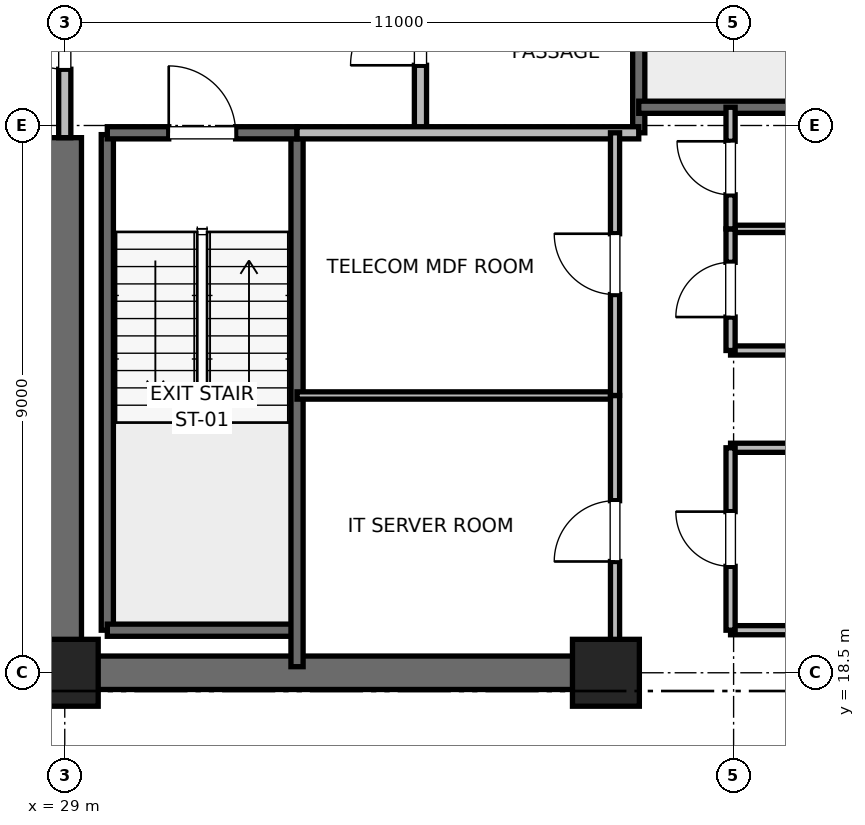
"""IFC4 building model, lengths in metres.
Left out: names, types, materials, properties, quantities, classifications, styles, units other than length and angle.
Written with IfcOpenShell. Run it as: python <this file> out.ifc"""

import sys

from ifc_helpers import new_model, si_unit, direction, frame, frame_2d, origin, origin_2d, place, context, subcontext, project, spatial, rectangle, extrude, element, fill, save


model = new_model("IFC4")
c1 = context("Model", 3, precision=1e-05, world=origin(), true_north=direction((0.0, 1.0)))
c2 = subcontext(c1, "Body", "Model", "MODEL_VIEW")
j1 = project(units=[si_unit("LENGTHUNIT", "METRE"), si_unit("PLANEANGLEUNIT", "RADIAN")], contexts=[c1])
p1 = place(None, origin())
s1 = spatial("IfcSite", under=j1, at=p1, CompositionType="ELEMENT")
p2 = place(p1, origin())
s2 = spatial("IfcBuilding", under=s1, at=p2, CompositionType="ELEMENT")
p3 = place(p2, frame((0.0, 0.0, 156.4)))
s3 = spatial("IfcBuildingStorey", under=s2, at=p3, CompositionType="ELEMENT", Elevation=156.4)
for number, where, z_axis, x_axis in (
    (1, (29.0, 18.5, 0.0), (0.0, 0.0, 1.0), (1.0, 0.0, 0.0)),
    (2, (37.9, 18.5, 0.0), (0.0, 0.0, 1.0), (1.0, 0.0, 0.0)),
):
    element("IfcColumn", number, at=place(p3, frame(where, z_axis=z_axis, x_axis=x_axis)), inside=s3, PredefinedType="PILASTER", context=c2, shape_type="SweptSolid", body=[
        extrude(rectangle(XDim=1.1, YDim=1.1, at=origin_2d()), origin(), (0.0, 0.0, 1.0), 4.0),
    ])
p4 = place(p3, frame((29.0, 18.5, 0.0), z_axis=(0.0, 0.0, 1.0), x_axis=(1.0, 0.0, 0.0)))
e3 = element("IfcWall", 3, at=p4, inside=s3, PredefinedType="SHEAR", context=c2, shape_type="SweptSolid", body=[
    extrude(rectangle(XDim=9.2, YDim=0.55, at=frame_2d((4.6, 0.0))), origin(), (0.0, 0.0, 1.0), 3.775),
])
p5 = place(p3, frame((29.0, 18.5, 0.0), z_axis=(0.0, 0.0, 1.0), x_axis=(0.0, 1.0, 0.0)))
e4 = element("IfcWall", 4, at=p5, inside=s3, PredefinedType="SHEAR", context=c2, shape_type="SweptSolid", body=[
    extrude(rectangle(XDim=8.8, YDim=0.55, at=frame_2d((4.4, 0.0))), origin(), (0.0, 0.0, 1.0), 3.775),
])
p6 = place(p3, frame((29.7, 19.2, 0.0), z_axis=(0.0, 0.0, 1.0), x_axis=(0.0, 1.0, 0.0)))
e5 = element("IfcWall", 5, at=p6, inside=s3, PredefinedType="SOLIDWALL", context=c2, shape_type="SweptSolid", body=[
    extrude(rectangle(XDim=8.15, YDim=0.2, at=frame_2d((4.075, 0.0))), origin(), (0.0, 0.0, 1.0), 3.775),
])
p7 = place(p3, frame((29.7, 19.2, 0.0), z_axis=(0.0, 0.0, 1.0), x_axis=(1.0, 0.0, 0.0)))
e6 = element("IfcWall", 6, at=p7, inside=s3, PredefinedType="SOLIDWALL", context=c2, shape_type="SweptSolid", body=[
    extrude(rectangle(XDim=3.12, YDim=0.2, at=frame_2d((1.56, 0.0))), origin(), (0.0, 0.0, 1.0), 3.775),
])
p8 = place(p3, frame((32.82, 18.6, 0.0), z_axis=(0.0, 0.0, 1.0), x_axis=(0.0, 1.0, 0.0)))
e7 = element("IfcWall", 7, at=p8, inside=s3, PredefinedType="SOLIDWALL", context=c2, shape_type="SweptSolid", body=[
    extrude(rectangle(XDim=8.78, YDim=0.2, at=frame_2d((4.39, 0.0))), origin(), (0.0, 0.0, 1.0), 3.775),
])
p9 = place(p3, frame((29.7, 27.38, 0.0), z_axis=(0.0, 0.0, 1.0), x_axis=(1.0, 0.0, 0.0)))
e8 = element("IfcWall", 8, at=p9, inside=s3, PredefinedType="SOLIDWALL", context=c2, shape_type="SweptSolid", body=[
    extrude(rectangle(XDim=3.12, YDim=0.2, at=frame_2d((1.56, 0.0))), origin(), (0.0, 0.0, 1.0), 3.775),
])
p10 = place(p9, frame((1.01, 0.0, 0.0)))
e9 = element("IfcOpeningElement", 9, at=p10, cuts=e8, PredefinedType="OPENING", context=c2, shape_type="SweptSolid", body=[
    extrude(rectangle(XDim=1.1, YDim=2.15, at=frame_2d((0.55, 1.075))), frame((0.0, 0.1, 0.0), z_axis=(0.0, -1.0, 0.0), x_axis=(1.0, 0.0, 0.0)), (0.0, 0.0, 1.0), 0.2),
])
p11 = place(p3, frame((38.44, 27.38, 0.0), z_axis=(0.0, 0.0, 1.0), x_axis=(0.0, 1.0, 0.0)))
e10 = element("IfcWall", 10, at=p11, inside=s3, PredefinedType="SOLIDWALL", context=c2, shape_type="SweptSolid", body=[
    extrude(rectangle(XDim=8.87, YDim=0.2, at=frame_2d((4.435, 0.0))), origin(), (0.0, 0.0, 1.0), 3.775),
])
p12 = place(p3, frame((38.44, 27.8, 0.0), z_axis=(0.0, 0.0, 1.0), x_axis=(1.0, 0.0, 0.0)))
e11 = element("IfcWall", 11, at=p12, inside=s3, PredefinedType="SOLIDWALL", context=c2, shape_type="SweptSolid", body=[
    extrude(rectangle(XDim=3.32, YDim=0.2, at=frame_2d((1.66, 0.0))), origin(), (0.0, 0.0, 1.0), 3.775),
])
p13 = place(p3, frame((34.85, 27.38, 0.0), z_axis=(0.0, 0.0, 1.0), x_axis=(0.0, 1.0, 0.0)))
e12 = element("IfcWall", 12, at=p13, inside=s3, PredefinedType="PARTITIONING", context=c2, shape_type="SweptSolid", body=[
    extrude(rectangle(XDim=3.37, YDim=0.2, at=frame_2d((1.685, 0.0))), origin(), (0.0, 0.0, 1.0), 3.775),
])
p14 = place(p13, frame((1.11, 0.0, 0.0)))
e13 = element("IfcOpeningElement", 13, at=p14, cuts=e12, PredefinedType="OPENING", context=c2, shape_type="SweptSolid", body=[
    extrude(rectangle(XDim=1.15, YDim=2.2, at=frame_2d((0.575, 1.1))), frame((0.0, 0.1, 0.0), z_axis=(0.0, -1.0, 0.0), x_axis=(1.0, 0.0, 0.0)), (0.0, 0.0, 1.0), 0.2),
])
p15 = place(p3, frame((29.0, 27.3, 0.0), z_axis=(0.0, 0.0, 1.0), x_axis=(0.0, 1.0, 0.0)))
e14 = element("IfcWall", 14, at=p15, inside=s3, PredefinedType="PARTITIONING", context=c2, shape_type="SweptSolid", body=[
    extrude(rectangle(XDim=3.4, YDim=0.2, at=frame_2d((1.7, 0.0))), origin(), (0.0, 0.0, 1.0), 2.755),
])
p16 = place(p15, frame((1.125, 0.0, 0.0)))
e15 = element("IfcOpeningElement", 15, at=p16, cuts=e14, PredefinedType="OPENING", context=c2, shape_type="SweptSolid", body=[
    extrude(rectangle(XDim=1.15, YDim=2.2, at=frame_2d((0.575, 1.1))), frame((0.0, 0.1, 0.0), z_axis=(0.0, -1.0, 0.0), x_axis=(1.0, 0.0, 0.0)), (0.0, 0.0, 1.0), 0.2),
])
p17 = place(p3, frame((32.82, 27.38, 0.0), z_axis=(0.0, 0.0, 1.0), x_axis=(1.0, 0.0, 0.0)))
e16 = element("IfcWall", 16, at=p17, inside=s3, PredefinedType="PARTITIONING", context=c2, shape_type="SweptSolid", body=[
    extrude(rectangle(XDim=5.62, YDim=0.2, at=frame_2d((2.81, 0.0))), origin(), (0.0, 0.0, 1.0), 3.775),
])
for number, where, z_axis, x_axis in (
    (17, (39.95, 19.2, 0.0), (0.0, 0.0, 1.0), (1.0, 0.0, 0.0)),
    (18, (39.95, 22.2, 0.0), (0.0, 0.0, 1.0), (1.0, 0.0, 0.0)),
    (19, (39.95, 23.8, 0.0), (0.0, 0.0, 1.0), (1.0, 0.0, 0.0)),
):
    element("IfcWall", number, at=place(p3, frame(where, z_axis=z_axis, x_axis=x_axis)), inside=s3, PredefinedType="PARTITIONING", context=c2, shape_type="SweptSolid", body=[
        extrude(rectangle(XDim=1.81, YDim=0.15, at=frame_2d((0.905, 0.0))), origin(), (0.0, 0.0, 1.0), 2.85),
    ])
p18 = place(p3, frame((39.95, 25.8, 0.0), z_axis=(0.0, 0.0, 1.0), x_axis=(1.0, 0.0, 0.0)))
e20 = element("IfcWall", 20, at=p18, inside=s3, PredefinedType="PARTITIONING", context=c2, shape_type="SweptSolid", body=[
    extrude(rectangle(XDim=1.81, YDim=0.12, at=frame_2d((0.905, 0.0))), origin(), (0.0, 0.0, 1.0), 2.85),
])
p19 = place(p3, frame((39.95, 19.2, 0.0), z_axis=(0.0, 0.0, 1.0), x_axis=(0.0, 1.0, 0.0)))
e21 = element("IfcWall", 21, at=p19, inside=s3, PredefinedType="PARTITIONING", context=c2, shape_type="SweptSolid", body=[
    extrude(rectangle(XDim=3.0, YDim=0.15, at=frame_2d((1.5, 0.0))), origin(), (0.0, 0.0, 1.0), 2.85),
])
p20 = place(p19, frame((1.05, 0.0, 0.0)))
e22 = element("IfcOpeningElement", 22, at=p20, cuts=e21, PredefinedType="OPENING", context=c2, shape_type="SweptSolid", body=[
    extrude(rectangle(XDim=0.9, YDim=2.1, at=frame_2d((0.45, 1.05))), frame((0.0, 0.075, 0.0), z_axis=(0.0, -1.0, 0.0), x_axis=(1.0, 0.0, 0.0)), (0.0, 0.0, 1.0), 0.15),
])
p21 = place(p3, frame((39.95, 23.8, 0.0), z_axis=(0.0, 0.0, 1.0), x_axis=(0.0, 1.0, 0.0)))
e23 = element("IfcWall", 23, at=p21, inside=s3, PredefinedType="PARTITIONING", context=c2, shape_type="SweptSolid", body=[
    extrude(rectangle(XDim=2.0, YDim=0.15, at=frame_2d((1.0, 0.0))), origin(), (0.0, 0.0, 1.0), 2.85),
])
p22 = place(p21, frame((0.55, 0.0, 0.0)))
e24 = element("IfcOpeningElement", 24, at=p22, cuts=e23, PredefinedType="OPENING", context=c2, shape_type="SweptSolid", body=[
    extrude(rectangle(XDim=0.9, YDim=2.1, at=frame_2d((0.45, 1.05))), frame((0.0, 0.075, 0.0), z_axis=(0.0, -1.0, 0.0), x_axis=(1.0, 0.0, 0.0)), (0.0, 0.0, 1.0), 0.15),
])
p23 = place(p3, frame((39.95, 25.8, 0.0), z_axis=(0.0, 0.0, 1.0), x_axis=(0.0, 1.0, 0.0)))
e25 = element("IfcWall", 25, at=p23, inside=s3, PredefinedType="PARTITIONING", context=c2, shape_type="SweptSolid", body=[
    extrude(rectangle(XDim=2.0, YDim=0.15, at=frame_2d((1.0, 0.0))), origin(), (0.0, 0.0, 1.0), 2.85),
])
p24 = place(p23, frame((0.56, 0.0, 0.0)))
e26 = element("IfcOpeningElement", 26, at=p24, cuts=e25, PredefinedType="OPENING", context=c2, shape_type="SweptSolid", body=[
    extrude(rectangle(XDim=0.88, YDim=2.1, at=frame_2d((0.44, 1.05))), frame((0.0, 0.075, 0.0), z_axis=(0.0, -1.0, 0.0), x_axis=(1.0, 0.0, 0.0)), (0.0, 0.0, 1.0), 0.15),
])
p25 = place(p3, frame((32.82, 23.06, 0.0), z_axis=(0.0, 0.0, 1.0), x_axis=(1.0, 0.0, 0.0)))
e27 = element("IfcWall", 27, at=p25, inside=s3, PredefinedType="PARTITIONING", context=c2, shape_type="SweptSolid", body=[
    extrude(rectangle(XDim=5.23, YDim=0.12, at=frame_2d((2.615, 0.0))), origin(), (0.0, 0.0, 1.0), 2.85),
])
p26 = place(p3, frame((38.05, 18.6, 0.0), z_axis=(0.0, 0.0, 1.0), x_axis=(0.0, 1.0, 0.0)))
e28 = element("IfcWall", 28, at=p26, inside=s3, PredefinedType="PARTITIONING", context=c2, shape_type="SweptSolid", body=[
    extrude(rectangle(XDim=4.46, YDim=0.15, at=frame_2d((2.23, 0.0))), origin(), (0.0, 0.0, 1.0), 2.755),
])
p27 = place(p26, frame((1.73, 0.0, 0.0)))
e29 = element("IfcOpeningElement", 29, at=p27, cuts=e28, PredefinedType="OPENING", context=c2, shape_type="SweptSolid", body=[
    extrude(rectangle(XDim=1.0, YDim=2.15, at=frame_2d((0.5, 1.075))), frame((0.0, 0.075, 0.0), z_axis=(0.0, -1.0, 0.0), x_axis=(1.0, 0.0, 0.0)), (0.0, 0.0, 1.0), 0.15),
])
p28 = place(p3, frame((38.05, 23.06, 0.0), z_axis=(0.0, 0.0, 1.0), x_axis=(0.0, 1.0, 0.0)))
e30 = element("IfcWall", 30, at=p28, inside=s3, PredefinedType="PARTITIONING", context=c2, shape_type="SweptSolid", body=[
    extrude(rectangle(XDim=4.32, YDim=0.15, at=frame_2d((2.16, 0.0))), origin(), (0.0, 0.0, 1.0), 2.85),
])
p29 = place(p28, frame((1.66, 0.0, 0.0)))
e31 = element("IfcOpeningElement", 31, at=p29, cuts=e30, PredefinedType="OPENING", context=c2, shape_type="SweptSolid", body=[
    extrude(rectangle(XDim=1.0, YDim=2.15, at=frame_2d((0.5, 1.075))), frame((0.0, 0.075, 0.0), z_axis=(0.0, -1.0, 0.0), x_axis=(1.0, 0.0, 0.0)), (0.0, 0.0, 1.0), 0.15),
])
p30 = place(p10, origin())
e32 = element("IfcDoor", 32, at=p30, inside=s3, OperationType="SINGLE_SWING_LEFT", PredefinedType="DOOR", context=c2, shape_type="SweptSolid", body=[
    extrude(rectangle(XDim=1.1, YDim=2.15, at=frame_2d((0.55, 1.075))), frame((0.0, 0.025, 0.0), z_axis=(0.0, -1.0, 0.0), x_axis=(1.0, 0.0, 0.0)), (0.0, 0.0, 1.0), 0.05),
])
fill(e9, e32)
p31 = place(p14, origin())
e33 = element("IfcDoor", 33, at=p31, inside=s3, OperationType="SINGLE_SWING_LEFT", PredefinedType="DOOR", context=c2, shape_type="SweptSolid", body=[
    extrude(rectangle(XDim=1.15, YDim=2.2, at=frame_2d((0.575, 1.1))), frame((0.0, 0.025, 0.0), z_axis=(0.0, -1.0, 0.0), x_axis=(1.0, 0.0, 0.0)), (0.0, 0.0, 1.0), 0.05),
])
fill(e13, e33)
p32 = place(p16, origin())
e34 = element("IfcDoor", 34, at=p32, inside=s3, OperationType="SINGLE_SWING_RIGHT", PredefinedType="DOOR", context=c2, shape_type="SweptSolid", body=[
    extrude(rectangle(XDim=1.15, YDim=2.2, at=frame_2d((0.575, 1.1))), frame((0.0, 0.025, 0.0), z_axis=(0.0, -1.0, 0.0), x_axis=(1.0, 0.0, 0.0)), (0.0, 0.0, 1.0), 0.05),
])
fill(e15, e34)
p33 = place(p20, origin())
e35 = element("IfcDoor", 35, at=p33, inside=s3, OperationType="SINGLE_SWING_RIGHT", PredefinedType="DOOR", context=c2, shape_type="SweptSolid", body=[
    extrude(rectangle(XDim=0.9, YDim=2.1, at=frame_2d((0.45, 1.05))), frame((0.0, 0.025, 0.0), z_axis=(0.0, -1.0, 0.0), x_axis=(1.0, 0.0, 0.0)), (0.0, 0.0, 1.0), 0.05),
])
fill(e22, e35)
p34 = place(p22, origin())
e36 = element("IfcDoor", 36, at=p34, inside=s3, OperationType="SINGLE_SWING_LEFT", PredefinedType="DOOR", context=c2, shape_type="SweptSolid", body=[
    extrude(rectangle(XDim=0.9, YDim=2.1, at=frame_2d((0.45, 1.05))), frame((0.0, 0.025, 0.0), z_axis=(0.0, -1.0, 0.0), x_axis=(1.0, 0.0, 0.0)), (0.0, 0.0, 1.0), 0.05),
])
fill(e24, e36)
p35 = place(p24, origin())
e37 = element("IfcDoor", 37, at=p35, inside=s3, OperationType="SINGLE_SWING_RIGHT", PredefinedType="DOOR", context=c2, shape_type="SweptSolid", body=[
    extrude(rectangle(XDim=0.88, YDim=2.1, at=frame_2d((0.44, 1.05))), frame((0.0, 0.025, 0.0), z_axis=(0.0, -1.0, 0.0), x_axis=(1.0, 0.0, 0.0)), (0.0, 0.0, 1.0), 0.05),
])
fill(e26, e37)
p36 = place(p27, origin())
e38 = element("IfcDoor", 38, at=p36, inside=s3, OperationType="SINGLE_SWING_LEFT", PredefinedType="DOOR", context=c2, shape_type="SweptSolid", body=[
    extrude(rectangle(XDim=1.0, YDim=2.15, at=frame_2d((0.5, 1.075))), frame((0.0, 0.025, 0.0), z_axis=(0.0, -1.0, 0.0), x_axis=(1.0, 0.0, 0.0)), (0.0, 0.0, 1.0), 0.05),
])
fill(e29, e38)
p37 = place(p29, origin())
e39 = element("IfcDoor", 39, at=p37, inside=s3, OperationType="SINGLE_SWING_RIGHT", PredefinedType="DOOR", context=c2, shape_type="SweptSolid", body=[
    extrude(rectangle(XDim=1.0, YDim=2.15, at=frame_2d((0.5, 1.075))), frame((0.0, 0.025, 0.0), z_axis=(0.0, -1.0, 0.0), x_axis=(1.0, 0.0, 0.0)), (0.0, 0.0, 1.0), 0.05),
])
fill(e31, e39)
save(model, sys.argv[1])
